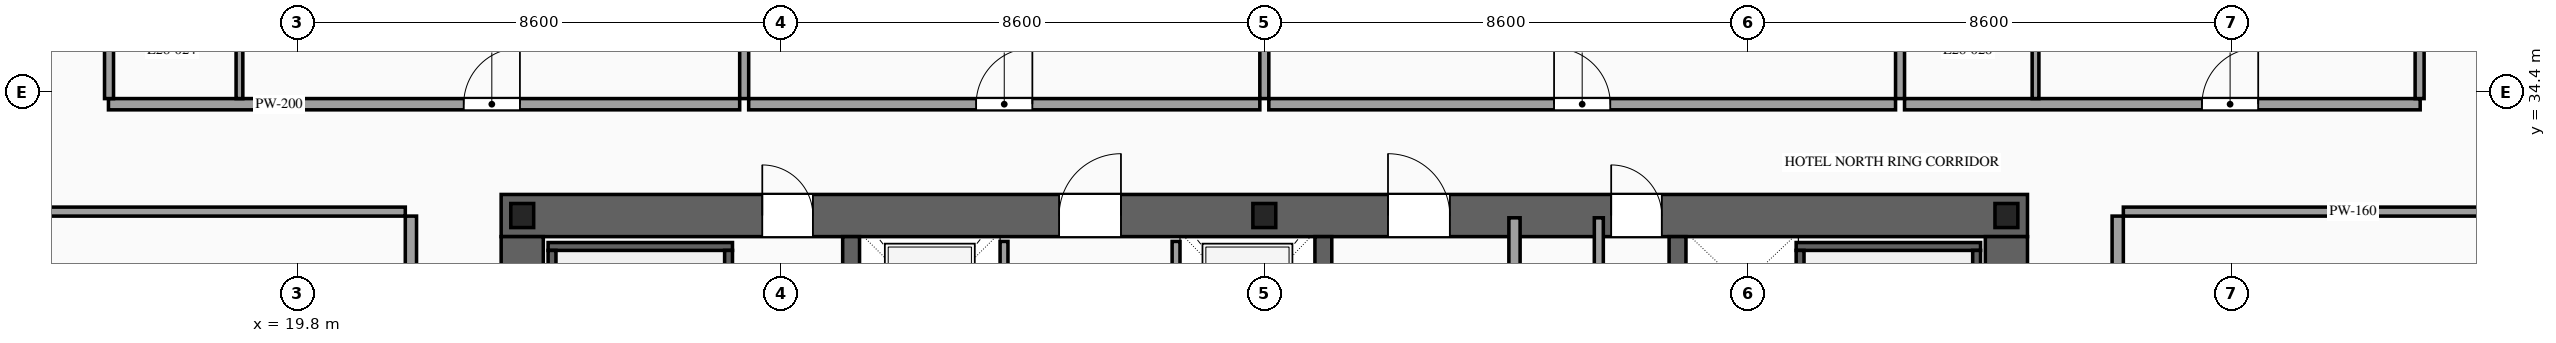
"""IFC4 building model, lengths in metres.
Left out: names, types, materials, properties, quantities, classifications, styles, units other than length and angle.
Written with IfcOpenShell. Run it as: python <this file> out.ifc"""

import sys

from ifc_helpers import new_model, si_unit, direction, frame, frame_2d, origin, origin_2d, place, context, subcontext, project, spatial, rectangle, i_section, extrude, source, transform, mapped, element, fill, save


model = new_model("IFC4")
c1 = context("Model", 3, precision=1e-05, world=origin(), true_north=direction((0.0, 1.0)))
c2 = subcontext(c1, "Body", "Model", "MODEL_VIEW")
j1 = project(units=[si_unit("LENGTHUNIT", "METRE"), si_unit("PLANEANGLEUNIT", "RADIAN")], contexts=[c1])
p1 = place(None, origin())
s1 = spatial("IfcSite", under=j1, at=p1, CompositionType="ELEMENT")
p2 = place(p1, origin())
s2 = spatial("IfcBuilding", under=s1, at=p2, CompositionType="ELEMENT")
p3 = place(p2, frame((0.0, 0.0, 108.2)))
s3 = spatial("IfcBuildingStorey", under=s2, at=p3, CompositionType="ELEMENT", Elevation=108.2)
p4 = place(p3, frame((23.425, 32.2, 0.0), z_axis=(0.0, 0.0, 1.0), x_axis=(1.0, 0.0, 0.0)))
e1 = element("IfcWall", 1, at=p4, inside=s3, PredefinedType="SHEAR", context=c2, shape_type="SweptSolid", body=[
    extrude(rectangle(XDim=27.15, YDim=0.75, at=frame_2d((13.575, 0.0))), origin(), (0.0, 0.0, 1.0), 3.6),
])
p5 = place(p4, frame((4.645, 0.0, 0.0)))
e2 = element("IfcOpeningElement", 2, at=p5, cuts=e1, PredefinedType="OPENING", context=c2, shape_type="SweptSolid", body=[
    extrude(rectangle(XDim=0.9, YDim=2.15, at=frame_2d((0.45, 1.075))), frame((0.0, 0.39, 0.0), z_axis=(0.0, -1.0, 0.0), x_axis=(1.0, 0.0, 0.0)), (0.0, 0.0, 1.0), 0.78),
])
p6 = place(p4, frame((9.925, 0.0, 0.0)))
e3 = element("IfcOpeningElement", 3, at=p6, cuts=e1, PredefinedType="OPENING", context=c2, shape_type="SweptSolid", body=[
    extrude(rectangle(XDim=1.1, YDim=2.2, at=frame_2d((0.55, 1.1))), frame((0.0, 0.39, 0.0), z_axis=(0.0, -1.0, 0.0), x_axis=(1.0, 0.0, 0.0)), (0.0, 0.0, 1.0), 0.78),
])
p7 = place(p4, frame((15.775, 0.0, 0.0)))
e4 = element("IfcOpeningElement", 4, at=p7, cuts=e1, PredefinedType="OPENING", context=c2, shape_type="SweptSolid", body=[
    extrude(rectangle(XDim=1.1, YDim=2.2, at=frame_2d((0.55, 1.1))), frame((0.0, 0.39, 0.0), z_axis=(0.0, -1.0, 0.0), x_axis=(1.0, 0.0, 0.0)), (0.0, 0.0, 1.0), 0.78),
])
p8 = place(p4, frame((19.745, 0.0, 0.0)))
e5 = element("IfcOpeningElement", 5, at=p8, cuts=e1, PredefinedType="OPENING", context=c2, shape_type="SweptSolid", body=[
    extrude(rectangle(XDim=0.9, YDim=2.15, at=frame_2d((0.45, 1.075))), frame((0.0, 0.39, 0.0), z_axis=(0.0, -1.0, 0.0), x_axis=(1.0, 0.0, 0.0)), (0.0, 0.0, 1.0), 0.78),
])
m1 = source(origin(), c2, "Body", "SweptSolid", [
    extrude(rectangle(XDim=12.05, YDim=0.75, at=frame_2d((6.025, 0.0))), origin(), (0.0, 0.0, 1.0), 3.6),
])
for number, where, z_axis, x_axis in (
    (6, (23.8, 19.775, 0.0), (0.0, 0.0, 1.0), (0.0, 1.0, 0.0)),
    (7, (50.2, 19.775, 0.0), (0.0, 0.0, 1.0), (0.0, 1.0, 0.0)),
):
    element("IfcWall", number, at=place(p3, frame(where, z_axis=z_axis, x_axis=x_axis)), inside=s3, PredefinedType="SHEAR", context=c2, shape_type="MappedRepresentation", body=[
        mapped(m1, transform((0.0, 0.0, 0.0), scale=1.0)),
    ])
m2 = source(origin(), c2, "Body", "SweptSolid", [
    extrude(rectangle(XDim=12.05, YDim=0.3, at=frame_2d((6.025, 0.0))), origin(), (0.0, 0.0, 1.0), 3.6),
])
for number, where, z_axis, x_axis in (
    (8, (29.65, 19.775, 0.0), (0.0, 0.0, 1.0), (0.0, 1.0, 0.0)),
    (9, (38.05, 19.775, 0.0), (0.0, 0.0, 1.0), (0.0, 1.0, 0.0)),
    (10, (44.35, 19.775, 0.0), (0.0, 0.0, 1.0), (0.0, 1.0, 0.0)),
):
    element("IfcWall", number, at=place(p3, frame(where, z_axis=z_axis, x_axis=x_axis)), inside=s3, PredefinedType="SOLIDWALL", context=c2, shape_type="MappedRepresentation", body=[
        mapped(m2, transform((0.0, 0.0, 0.0), scale=1.0)),
    ])
m3 = source(origin(), c2, "Body", "SweptSolid", [
    extrude(i_section(OverallWidth=0.407, OverallDepth=0.428, WebThickness=0.02, FlangeThickness=0.035, at=origin_2d()), origin(), (0.0, 0.0, 1.0), 3.6),
])
for number, where, z_axis, x_axis in (
    (11, (23.8, 32.2, 0.0), (0.0, 0.0, 1.0), (1.0, 0.0, 0.0)),
    (12, (37.0, 32.2, 0.0), (0.0, 0.0, 1.0), (1.0, 0.0, 0.0)),
    (13, (50.2, 32.2, 0.0), (0.0, 0.0, 1.0), (1.0, 0.0, 0.0)),
):
    element("IfcColumn", number, at=place(p3, frame(where, z_axis=z_axis, x_axis=x_axis)), inside=s3, PredefinedType="COLUMN", context=c2, shape_type="MappedRepresentation", body=[
        mapped(m3, transform((0.0, 0.0, 0.0), scale=1.0)),
    ])
p9 = place(p3, frame((32.37, 29.4, 0.0), z_axis=(0.0, 0.0, 1.0), x_axis=(0.0, 1.0, 0.0)))
e14 = element("IfcWall", 14, at=p9, inside=s3, PredefinedType="SOLIDWALL", context=c2, shape_type="SweptSolid", body=[
    extrude(rectangle(XDim=2.34, YDim=0.14, at=frame_2d((1.17, 0.0))), origin(), (0.0, 0.0, 1.0), 3.38),
])
p10 = place(p9, frame((0.62, 0.0, 0.0)))
e15 = element("IfcOpeningElement", 15, at=p10, cuts=e14, PredefinedType="OPENING", context=c2, shape_type="SweptSolid", body=[
    extrude(rectangle(XDim=1.1, YDim=2.2, at=frame_2d((0.55, 1.1))), frame((0.0, 0.085, 0.0), z_axis=(0.0, -1.0, 0.0), x_axis=(1.0, 0.0, 0.0)), (0.0, 0.0, 1.0), 0.17),
])
p11 = place(p3, frame((35.43, 29.4, 0.0), z_axis=(0.0, 0.0, 1.0), x_axis=(0.0, 1.0, 0.0)))
e16 = element("IfcWall", 16, at=p11, inside=s3, PredefinedType="SOLIDWALL", context=c2, shape_type="SweptSolid", body=[
    extrude(rectangle(XDim=2.34, YDim=0.14, at=frame_2d((1.17, 0.0))), origin(), (0.0, 0.0, 1.0), 3.38),
])
p12 = place(p11, frame((0.62, 0.0, 0.0)))
e17 = element("IfcOpeningElement", 17, at=p12, cuts=e16, PredefinedType="OPENING", context=c2, shape_type="SweptSolid", body=[
    extrude(rectangle(XDim=1.1, YDim=2.2, at=frame_2d((0.55, 1.1))), frame((0.0, 0.085, 0.0), z_axis=(0.0, -1.0, 0.0), x_axis=(1.0, 0.0, 0.0)), (0.0, 0.0, 1.0), 0.17),
])
m4 = source(origin(), c2, "Body", "SweptSolid", [
    extrude(rectangle(XDim=3.28, YDim=0.14, at=frame_2d((1.64, 0.0))), origin(), (0.0, 0.0, 1.0), 3.38),
])
p13 = place(p3, frame((24.26, 31.65, 0.0), z_axis=(0.0, 0.0, 1.0), x_axis=(1.0, 0.0, 0.0)))
e18 = element("IfcWall", 18, at=p13, inside=s3, PredefinedType="SOLIDWALL", context=c2, shape_type="MappedRepresentation", body=[
    mapped(m4, transform((0.0, 0.0, 0.0), scale=1.0)),
])
m5 = source(origin(), c2, "Body", "SweptSolid", [
    extrude(rectangle(XDim=8.94, YDim=0.14, at=frame_2d((4.47, 0.0))), origin(), (0.0, 0.0, 1.0), 3.38),
])
for number, where, z_axis, x_axis in (
    (19, (24.33, 22.64, 0.0), (0.0, 0.0, 1.0), (0.0, 1.0, 0.0)),
    (20, (27.47, 22.64, 0.0), (0.0, 0.0, 1.0), (0.0, 1.0, 0.0)),
):
    element("IfcWall", number, at=place(p3, frame(where, z_axis=z_axis, x_axis=x_axis)), inside=s3, PredefinedType="SOLIDWALL", context=c2, shape_type="MappedRepresentation", body=[
        mapped(m5, transform((0.0, 0.0, 0.0), scale=1.0)),
    ])
p14 = place(p3, frame((46.46, 31.65, 0.0), z_axis=(0.0, 0.0, 1.0), x_axis=(1.0, 0.0, 0.0)))
e21 = element("IfcWall", 21, at=p14, inside=s3, PredefinedType="SOLIDWALL", context=c2, shape_type="MappedRepresentation", body=[
    mapped(m4, transform((0.0, 0.0, 0.0), scale=1.0)),
])
for number, where, z_axis, x_axis in (
    (22, (46.53, 22.64, 0.0), (0.0, 0.0, 1.0), (0.0, 1.0, 0.0)),
    (23, (49.67, 22.64, 0.0), (0.0, 0.0, 1.0), (0.0, 1.0, 0.0)),
):
    element("IfcWall", number, at=place(p3, frame(where, z_axis=z_axis, x_axis=x_axis)), inside=s3, PredefinedType="SOLIDWALL", context=c2, shape_type="MappedRepresentation", body=[
        mapped(m5, transform((0.0, 0.0, 0.0), scale=1.0)),
    ])
m6 = source(origin(), c2, "Body", "SweptSolid", [
    extrude(rectangle(XDim=12.72, YDim=0.2, at=frame_2d((6.36, 0.0))), origin(), (0.0, 0.0, 1.0), 3.38),
])
p15 = place(p3, frame((41.45, 19.44, 0.0), z_axis=(0.0, 0.0, 1.0), x_axis=(0.0, 1.0, 0.0)))
e24 = element("IfcWall", 24, at=p15, inside=s3, PredefinedType="PARTITIONING", context=c2, shape_type="MappedRepresentation", body=[
    mapped(m6, transform((0.0, 0.0, 0.0), scale=1.0)),
])
m7 = source(origin(), c2, "Body", "SweptSolid", [
    extrude(rectangle(XDim=10.72, YDim=0.16, at=frame_2d((5.36, 0.0))), origin(), (0.0, 0.0, 1.0), 3.38),
])
p16 = place(p3, frame((42.95, 21.44, 0.0), z_axis=(0.0, 0.0, 1.0), x_axis=(0.0, 1.0, 0.0)))
e25 = element("IfcWall", 25, at=p16, inside=s3, PredefinedType="PARTITIONING", context=c2, shape_type="MappedRepresentation", body=[
    mapped(m7, transform((0.0, 0.0, 0.0), scale=1.0)),
])
p17 = place(p3, frame((16.44, 34.18, 0.0), z_axis=(0.0, 0.0, 1.0), x_axis=(1.0, 0.0, 0.0)))
e26 = element("IfcWall", 26, at=p17, inside=s3, PredefinedType="PARTITIONING", context=c2, shape_type="SweptSolid", body=[
    extrude(rectangle(XDim=11.228, YDim=0.2, at=frame_2d((5.614, 0.0))), origin(), (0.0, 0.0, 1.0), 3.38),
])
p18 = place(p17, frame((6.319, 0.0, 0.0)))
e27 = element("IfcOpeningElement", 27, at=p18, cuts=e26, PredefinedType="OPENING", context=c2, shape_type="SweptSolid", body=[
    extrude(rectangle(XDim=1.0, YDim=2.2, at=frame_2d((0.5, 1.1))), frame((0.0, 0.115, 0.0), z_axis=(0.0, -1.0, 0.0), x_axis=(1.0, 0.0, 0.0)), (0.0, 0.0, 1.0), 0.23),
])
m8 = source(origin(), c2, "Body", "SweptSolid", [
    extrude(rectangle(XDim=14.97, YDim=0.16, at=frame_2d((7.485, 0.0))), origin(), (0.0, 0.0, 1.0), 3.38),
])
p19 = place(p3, frame((27.748, 34.28, 0.0), z_axis=(0.0, 0.0, 1.0), x_axis=(0.0, 1.0, 0.0)))
e28 = element("IfcWall", 28, at=p19, inside=s3, PredefinedType="PARTITIONING", context=c2, shape_type="MappedRepresentation", body=[
    mapped(m8, transform((0.0, 0.0, 0.0), scale=1.0)),
])
m9 = source(origin(), c2, "Body", "SweptSolid", [
    extrude(rectangle(XDim=2.42, YDim=0.12, at=frame_2d((1.21, 0.0))), origin(), (0.0, 0.0, 1.0), 3.38),
])
p20 = place(p3, frame((18.77, 34.28, 0.0), z_axis=(0.0, 0.0, 1.0), x_axis=(0.0, 1.0, 0.0)))
e29 = element("IfcWall", 29, at=p20, inside=s3, PredefinedType="PARTITIONING", context=c2, shape_type="MappedRepresentation", body=[
    mapped(m9, transform((0.0, 0.0, 0.0), scale=1.0)),
])
p21 = place(p3, frame((27.828, 34.18, 0.0), z_axis=(0.0, 0.0, 1.0), x_axis=(1.0, 0.0, 0.0)))
e30 = element("IfcWall", 30, at=p21, inside=s3, PredefinedType="PARTITIONING", context=c2, shape_type="SweptSolid", body=[
    extrude(rectangle(XDim=9.092, YDim=0.2, at=frame_2d((4.546, 0.0))), origin(), (0.0, 0.0, 1.0), 3.38),
])
p22 = place(p21, frame((4.046, 0.0, 0.0)))
e31 = element("IfcOpeningElement", 31, at=p22, cuts=e30, PredefinedType="OPENING", context=c2, shape_type="SweptSolid", body=[
    extrude(rectangle(XDim=1.0, YDim=2.2, at=frame_2d((0.5, 1.1))), frame((0.0, 0.115, 0.0), z_axis=(0.0, -1.0, 0.0), x_axis=(1.0, 0.0, 0.0)), (0.0, 0.0, 1.0), 0.23),
])
m10 = source(origin(), c2, "Body", "SweptSolid", [
    extrude(rectangle(XDim=14.97, YDim=0.16, at=frame_2d((7.485, 0.0))), origin(), (0.0, 0.0, 1.0), 2.675),
])
p23 = place(p3, frame((37.0, 34.28, 0.0), z_axis=(0.0, 0.0, 1.0), x_axis=(0.0, 1.0, 0.0)))
e32 = element("IfcWall", 32, at=p23, inside=s3, PredefinedType="PARTITIONING", context=c2, shape_type="MappedRepresentation", body=[
    mapped(m10, transform((0.0, 0.0, 0.0), scale=1.0)),
])
p24 = place(p3, frame((37.08, 34.18, 0.0), z_axis=(0.0, 0.0, 1.0), x_axis=(1.0, 0.0, 0.0)))
e33 = element("IfcWall", 33, at=p24, inside=s3, PredefinedType="PARTITIONING", context=c2, shape_type="SweptSolid", body=[
    extrude(rectangle(XDim=11.148, YDim=0.2, at=frame_2d((5.574, 0.0))), origin(), (0.0, 0.0, 1.0), 3.38),
])
p25 = place(p24, frame((5.074, 0.0, 0.0)))
e34 = element("IfcOpeningElement", 34, at=p25, cuts=e33, PredefinedType="OPENING", context=c2, shape_type="SweptSolid", body=[
    extrude(rectangle(XDim=1.0, YDim=2.2, at=frame_2d((0.5, 1.1))), frame((0.0, 0.115, 0.0), z_axis=(0.0, -1.0, 0.0), x_axis=(1.0, 0.0, 0.0)), (0.0, 0.0, 1.0), 0.23),
])
p26 = place(p3, frame((48.308, 34.28, 0.0), z_axis=(0.0, 0.0, 1.0), x_axis=(0.0, 1.0, 0.0)))
e35 = element("IfcWall", 35, at=p26, inside=s3, PredefinedType="PARTITIONING", context=c2, shape_type="MappedRepresentation", body=[
    mapped(m8, transform((0.0, 0.0, 0.0), scale=1.0)),
])
p27 = place(p3, frame((48.388, 34.18, 0.0), z_axis=(0.0, 0.0, 1.0), x_axis=(1.0, 0.0, 0.0)))
e36 = element("IfcWall", 36, at=p27, inside=s3, PredefinedType="PARTITIONING", context=c2, shape_type="SweptSolid", body=[
    extrude(rectangle(XDim=9.172, YDim=0.2, at=frame_2d((4.586, 0.0))), origin(), (0.0, 0.0, 1.0), 3.38),
])
p28 = place(p27, frame((5.291, 0.0, 0.0)))
e37 = element("IfcOpeningElement", 37, at=p28, cuts=e36, PredefinedType="OPENING", context=c2, shape_type="SweptSolid", body=[
    extrude(rectangle(XDim=1.0, YDim=2.2, at=frame_2d((0.5, 1.1))), frame((0.0, 0.115, 0.0), z_axis=(0.0, -1.0, 0.0), x_axis=(1.0, 0.0, 0.0)), (0.0, 0.0, 1.0), 0.23),
])
m11 = source(origin(), c2, "Body", "SweptSolid", [
    extrude(rectangle(XDim=14.82, YDim=0.16, at=frame_2d((7.41, 0.0))), origin(), (0.0, 0.0, 1.0), 3.38),
])
for number, where, z_axis, x_axis in (
    (38, (16.45, 34.28, 0.0), (0.0, 0.0, 1.0), (0.0, 1.0, 0.0)),
    (39, (57.55, 34.28, 0.0), (0.0, 0.0, 1.0), (0.0, 1.0, 0.0)),
):
    element("IfcWall", number, at=place(p3, frame(where, z_axis=z_axis, x_axis=x_axis)), inside=s3, PredefinedType="PARTITIONING", context=c2, shape_type="MappedRepresentation", body=[
        mapped(m11, transform((0.0, 0.0, 0.0), scale=1.0)),
    ])
p29 = place(p3, frame((50.718, 34.28, 0.0), z_axis=(0.0, 0.0, 1.0), x_axis=(0.0, 1.0, 0.0)))
e40 = element("IfcWall", 40, at=p29, inside=s3, PredefinedType="PARTITIONING", context=c2, shape_type="MappedRepresentation", body=[
    mapped(m9, transform((0.0, 0.0, 0.0), scale=1.0)),
])
p30 = place(p3, frame((21.82, 19.41, 0.0), z_axis=(0.0, 0.0, 1.0), x_axis=(0.0, 1.0, 0.0)))
e41 = element("IfcWall", 41, at=p30, inside=s3, PredefinedType="PARTITIONING", context=c2, shape_type="SweptSolid", body=[
    extrude(rectangle(XDim=12.78, YDim=0.2, at=frame_2d((6.39, 0.0))), origin(), (0.0, 0.0, 1.0), 3.38),
])
p31 = place(p30, frame((5.89, 0.0, 0.0)))
e42 = element("IfcOpeningElement", 42, at=p31, cuts=e41, PredefinedType="OPENING", context=c2, shape_type="SweptSolid", body=[
    extrude(rectangle(XDim=1.0, YDim=2.2, at=frame_2d((0.5, 1.1))), frame((0.0, 0.115, 0.0), z_axis=(0.0, -1.0, 0.0), x_axis=(1.0, 0.0, 0.0)), (0.0, 0.0, 1.0), 0.23),
])
m12 = source(origin(), c2, "Body", "SweptSolid", [
    extrude(rectangle(XDim=8.17, YDim=0.16, at=frame_2d((4.085, 0.0))), origin(), (0.0, 0.0, 1.0), 2.875),
])
p32 = place(p3, frame((13.55, 32.27, 0.0), z_axis=(0.0, 0.0, 1.0), x_axis=(1.0, 0.0, 0.0)))
e43 = element("IfcWall", 43, at=p32, inside=s3, PredefinedType="PARTITIONING", context=c2, shape_type="MappedRepresentation", body=[
    mapped(m12, transform((0.0, 0.0, 0.0), scale=1.0)),
])
p33 = place(p3, frame((52.18, 19.41, 0.0), z_axis=(0.0, 0.0, 1.0), x_axis=(0.0, 1.0, 0.0)))
e44 = element("IfcWall", 44, at=p33, inside=s3, PredefinedType="PARTITIONING", context=c2, shape_type="SweptSolid", body=[
    extrude(rectangle(XDim=12.78, YDim=0.2, at=frame_2d((6.39, 0.0))), origin(), (0.0, 0.0, 1.0), 3.38),
])
p34 = place(p33, frame((5.89, 0.0, 0.0)))
e45 = element("IfcOpeningElement", 45, at=p34, cuts=e44, PredefinedType="OPENING", context=c2, shape_type="SweptSolid", body=[
    extrude(rectangle(XDim=1.0, YDim=2.2, at=frame_2d((0.5, 1.1))), frame((0.0, 0.115, 0.0), z_axis=(0.0, -1.0, 0.0), x_axis=(1.0, 0.0, 0.0)), (0.0, 0.0, 1.0), 0.23),
])
p35 = place(p3, frame((52.28, 32.27, 0.0), z_axis=(0.0, 0.0, 1.0), x_axis=(1.0, 0.0, 0.0)))
e46 = element("IfcWall", 46, at=p35, inside=s3, PredefinedType="PARTITIONING", context=c2, shape_type="MappedRepresentation", body=[
    mapped(m12, transform((0.0, 0.0, 0.0), scale=1.0)),
])
m13 = source(origin(), c2, "Body", "SweptSolid", [
    extrude(rectangle(XDim=0.9, YDim=2.15, at=frame_2d((0.45, 1.075))), frame((0.0, 0.025, 0.0), z_axis=(0.0, -1.0, 0.0), x_axis=(1.0, 0.0, 0.0)), (0.0, 0.0, 1.0), 0.05),
])
p36 = place(p5, origin())
e47 = element("IfcDoor", 47, at=p36, inside=s3, OperationType="SINGLE_SWING_LEFT", PredefinedType="DOOR", context=c2, shape_type="MappedRepresentation", body=[
    mapped(m13, transform((0.0, 0.0, 0.0), scale=1.0)),
])
fill(e2, e47)
m14 = source(origin(), c2, "Body", "SweptSolid", [
    extrude(rectangle(XDim=1.1, YDim=2.2, at=frame_2d((0.55, 1.1))), frame((0.0, 0.025, 0.0), z_axis=(0.0, -1.0, 0.0), x_axis=(1.0, 0.0, 0.0)), (0.0, 0.0, 1.0), 0.05),
])
p37 = place(p6, origin())
e48 = element("IfcDoor", 48, at=p37, inside=s3, OperationType="SINGLE_SWING_RIGHT", PredefinedType="DOOR", context=c2, shape_type="MappedRepresentation", body=[
    mapped(m14, transform((0.0, 0.0, 0.0), scale=1.0)),
])
fill(e3, e48)
p38 = place(p7, origin())
e49 = element("IfcDoor", 49, at=p38, inside=s3, OperationType="SINGLE_SWING_LEFT", PredefinedType="DOOR", context=c2, shape_type="MappedRepresentation", body=[
    mapped(m14, transform((0.0, 0.0, 0.0), scale=1.0)),
])
fill(e4, e49)
p39 = place(p8, origin())
e50 = element("IfcDoor", 50, at=p39, inside=s3, OperationType="SINGLE_SWING_LEFT", PredefinedType="DOOR", context=c2, shape_type="MappedRepresentation", body=[
    mapped(m13, transform((0.0, 0.0, 0.0), scale=1.0)),
])
fill(e5, e50)
m15 = source(origin(), c2, "Body", "SweptSolid", [
    extrude(rectangle(XDim=1.0, YDim=2.2, at=frame_2d((0.5, 1.1))), frame((0.0, 0.025, 0.0), z_axis=(0.0, -1.0, 0.0), x_axis=(1.0, 0.0, 0.0)), (0.0, 0.0, 1.0), 0.05),
])
p40 = place(p18, origin())
e51 = element("IfcDoor", 51, at=p40, inside=s3, OperationType="SINGLE_SWING_RIGHT", PredefinedType="DOOR", context=c2, shape_type="MappedRepresentation", body=[
    mapped(m15, transform((0.0, 0.0, 0.0), scale=1.0)),
])
fill(e27, e51)
p41 = place(p22, origin())
e52 = element("IfcDoor", 52, at=p41, inside=s3, OperationType="SINGLE_SWING_RIGHT", PredefinedType="DOOR", context=c2, shape_type="MappedRepresentation", body=[
    mapped(m15, transform((0.0, 0.0, 0.0), scale=1.0)),
])
fill(e31, e52)
p42 = place(p25, origin())
e53 = element("IfcDoor", 53, at=p42, inside=s3, OperationType="SINGLE_SWING_LEFT", PredefinedType="DOOR", context=c2, shape_type="MappedRepresentation", body=[
    mapped(m15, transform((0.0, 0.0, 0.0), scale=1.0)),
])
fill(e34, e53)
p43 = place(p28, origin())
e54 = element("IfcDoor", 54, at=p43, inside=s3, OperationType="SINGLE_SWING_RIGHT", PredefinedType="DOOR", context=c2, shape_type="MappedRepresentation", body=[
    mapped(m15, transform((0.0, 0.0, 0.0), scale=1.0)),
])
fill(e37, e54)
save(model, sys.argv[1])
